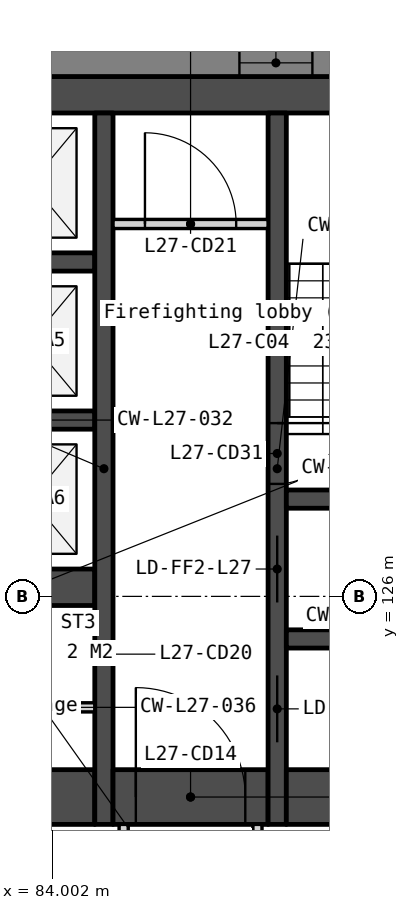
"""IFC4 building model, lengths in metres.
Left out: names, types, materials, properties, quantities, classifications, styles, units other than length and angle.
Written with IfcOpenShell. Run it as: python <this file> out.ifc"""

import sys

from ifc_helpers import new_model, si_unit, direction, frame, frame_2d, origin, place, context, subcontext, project, spatial, polyline, rectangle, outline, extrude, element, fill, save


model = new_model("IFC4")
c1 = context("Model", 3, precision=1e-05, world=origin(), true_north=direction((0.0, 1.0)))
c2 = subcontext(c1, "Body", "Model", "MODEL_VIEW")
j1 = project(units=[si_unit("LENGTHUNIT", "METRE"), si_unit("PLANEANGLEUNIT", "RADIAN")], contexts=[c1])
p1 = place(None, origin())
s1 = spatial("IfcSite", under=j1, at=p1, CompositionType="ELEMENT")
p2 = place(p1, origin())
s2 = spatial("IfcBuilding", under=s1, at=p2, CompositionType="ELEMENT")
p3 = place(p2, frame((0.0, 0.0, 109.8)))
s3 = spatial("IfcBuildingStorey", under=s2, at=p3, CompositionType="ELEMENT", Elevation=109.8)
p4 = place(p3, frame((66.0, 134.25, 0.0), z_axis=(0.0, 0.0, 1.0), x_axis=(1.0, 0.0, 0.0)))
e1 = element("IfcWall", 1, at=p4, inside=s3, PredefinedType="SOLIDWALL", context=c2, shape_type="SweptSolid", body=[
    extrude(rectangle(XDim=28.0, YDim=0.6, at=frame_2d((14.0, 0.0))), origin(), (0.0, 0.0, 1.0), 3.35),
])
p5 = place(p3, frame((81.8, 122.7, 0.0), z_axis=(0.0, 0.0, 1.0), x_axis=(1.0, 0.0, 0.0)))
e2 = element("IfcWall", 2, at=p5, inside=s3, PredefinedType="SOLIDWALL", context=c2, shape_type="SweptSolid", body=[
    extrude(rectangle(XDim=2.9, YDim=0.9, at=frame_2d((1.45, 0.0))), origin(), (0.0, 0.0, 1.0), 3.35),
])
p6 = place(p5, frame((0.05, 0.0, 0.0)))
e3 = element("IfcOpeningElement", 3, at=p6, cuts=e2, PredefinedType="OPENING", context=c2, shape_type="SweptSolid", body=[
    extrude(rectangle(XDim=1.5, YDim=2.1, at=frame_2d((0.75, 1.05))), frame((0.0, 0.46, 0.0), z_axis=(0.0, -1.0, 0.0), x_axis=(1.0, 0.0, 0.0)), (0.0, 0.0, 1.0), 0.92),
])
for number, where, z_axis, x_axis in (
    (4, (82.6, 131.5, 0.0), (0.0, 0.0, 1.0), (1.0, 0.0, 0.0)),
    (5, (82.6, 128.9, 0.0), (0.0, 0.0, 1.0), (1.0, 0.0, 0.0)),
):
    element("IfcWall", number, at=place(p3, frame(where, z_axis=z_axis, x_axis=x_axis)), inside=s3, PredefinedType="SOLIDWALL", context=c2, shape_type="SweptSolid", body=[
        extrude(rectangle(XDim=2.1, YDim=0.3, at=frame_2d((1.05, 0.0))), origin(), (0.0, 0.0, 1.0), 3.35),
    ])
p7 = place(p3, frame((82.6, 126.15, 0.0), z_axis=(0.0, 0.0, 1.0), x_axis=(1.0, 0.0, 0.0)))
e6 = element("IfcWall", 6, at=p7, inside=s3, PredefinedType="SOLIDWALL", context=c2, shape_type="SweptSolid", body=[
    extrude(rectangle(XDim=2.1, YDim=0.6, at=frame_2d((1.05, 0.0))), origin(), (0.0, 0.0, 1.0), 3.35),
])
p8 = place(p3, frame((83.35, 124.175, 0.0), z_axis=(0.0, 0.0, 1.0), x_axis=(1.0, 0.0, 0.0)))
e7 = element("IfcWall", 7, at=p8, inside=s3, PredefinedType="PARTITIONING", context=c2, shape_type="SweptSolid", body=[
    extrude(rectangle(XDim=1.35, YDim=0.15, at=frame_2d((0.675, 0.0))), origin(), (0.0, 0.0, 1.0), 3.35),
])
p9 = place(p3, frame((84.85, 133.95, 0.0), z_axis=(0.0, 0.0, 1.0), x_axis=(0.0, -1.0, 0.0)))
e8 = element("IfcWall", 8, at=p9, inside=s3, PredefinedType="SOLIDWALL", context=c2, shape_type="SweptSolid", body=[
    extrude(rectangle(XDim=11.7, YDim=0.3, at=frame_2d((5.85, 0.0))), origin(), (0.0, 0.0, 1.0), 3.35),
])
p10 = place(p3, frame((85.0, 132.125, 0.0), z_axis=(0.0, 0.0, 1.0), x_axis=(1.0, 0.0, 0.0)))
e9 = element("IfcWall", 9, at=p10, inside=s3, PredefinedType="PARTITIONING", context=c2, shape_type="SweptSolid", body=[
    extrude(rectangle(XDim=2.55, YDim=0.15, at=frame_2d((1.275, 0.0))), origin(), (0.0, 0.0, 1.0), 3.35),
])
p11 = place(p10, frame((0.525, 0.0, 0.0)))
e10 = element("IfcOpeningElement", 10, at=p11, cuts=e9, PredefinedType="OPENING", context=c2, shape_type="SweptSolid", body=[
    extrude(rectangle(XDim=1.5, YDim=2.1, at=frame_2d((0.75, 1.05))), frame((0.0, 0.085, 0.0), z_axis=(0.0, -1.0, 0.0), x_axis=(1.0, 0.0, 0.0)), (0.0, 0.0, 1.0), 0.17),
])
p12 = place(p3, frame((85.0, 122.7, 0.0), z_axis=(0.0, 0.0, 1.0), x_axis=(1.0, 0.0, 0.0)))
e11 = element("IfcWall", 11, at=p12, inside=s3, PredefinedType="SOLIDWALL", context=c2, shape_type="SweptSolid", body=[
    extrude(rectangle(XDim=2.55, YDim=0.9, at=frame_2d((1.275, 0.0))), origin(), (0.0, 0.0, 1.0), 3.35),
])
p13 = place(p12, frame((0.375, 0.0, 0.0)))
e12 = element("IfcOpeningElement", 12, at=p13, cuts=e11, PredefinedType="OPENING", context=c2, shape_type="SweptSolid", body=[
    extrude(rectangle(XDim=1.8, YDim=2.1, at=frame_2d((0.9, 1.05))), frame((0.0, 0.46, 0.0), z_axis=(0.0, -1.0, 0.0), x_axis=(1.0, 0.0, 0.0)), (0.0, 0.0, 1.0), 0.92),
])
p14 = place(p3, frame((85.175, 122.25, 0.0), z_axis=(0.0, 0.0, 1.0), x_axis=(0.0, -1.0, 0.0)))
e13 = element("IfcWall", 13, at=p14, inside=s3, PredefinedType="PARTITIONING", context=c2, shape_type="SweptSolid", body=[
    extrude(rectangle(XDim=2.1, YDim=0.15, at=frame_2d((1.05, 0.0))), origin(), (0.0, 0.0, 1.0), 3.35),
])
p15 = place(p14, frame((0.55, 0.0, 0.0)))
e14 = element("IfcOpeningElement", 14, at=p15, cuts=e13, PredefinedType="OPENING", context=c2, shape_type="SweptSolid", body=[
    extrude(rectangle(XDim=1.0, YDim=2.1, at=frame_2d((0.5, 1.05))), frame((0.0, 0.085, 0.0), z_axis=(0.0, -1.0, 0.0), x_axis=(1.0, 0.0, 0.0)), (0.0, 0.0, 1.0), 0.17),
])
p16 = place(p3, frame((87.375, 122.25, 0.0), z_axis=(0.0, 0.0, 1.0), x_axis=(0.0, -1.0, 0.0)))
e15 = element("IfcWall", 15, at=p16, inside=s3, PredefinedType="PARTITIONING", context=c2, shape_type="SweptSolid", body=[
    extrude(rectangle(XDim=2.1, YDim=0.15, at=frame_2d((1.05, 0.0))), origin(), (0.0, 0.0, 1.0), 3.35),
])
p17 = place(p3, frame((87.7, 133.95, 0.0), z_axis=(0.0, 0.0, 1.0), x_axis=(0.0, -1.0, 0.0)))
e16 = element("IfcWall", 16, at=p17, inside=s3, PredefinedType="SOLIDWALL", context=c2, shape_type="SweptSolid", body=[
    extrude(rectangle(XDim=11.7, YDim=0.3, at=frame_2d((5.85, 0.0))), origin(), (0.0, 0.0, 1.0), 3.35),
])
p18 = place(p17, frame((6.95, 0.0, 0.0)))
e17 = element("IfcOpeningElement", 17, at=p18, cuts=e16, PredefinedType="OPENING", context=c2, shape_type="SweptSolid", body=[
    extrude(rectangle(XDim=1.1, YDim=2.1, at=frame_2d((0.55, 1.05))), frame((0.0, 0.16, 0.0), z_axis=(0.0, -1.0, 0.0), x_axis=(1.0, 0.0, 0.0)), (0.0, 0.0, 1.0), 0.32),
])
p19 = place(p17, frame((5.1, 0.0, 0.0)))
e18 = element("IfcOpeningElement", 18, at=p19, cuts=e16, PredefinedType="OPENING", context=c2, shape_type="SweptSolid", body=[
    extrude(rectangle(XDim=1.0, YDim=2.1, at=frame_2d((0.5, 1.05))), frame((0.0, 0.16, 0.0), z_axis=(0.0, -1.0, 0.0), x_axis=(1.0, 0.0, 0.0)), (0.0, 0.0, 1.0), 0.32),
])
p20 = place(p17, frame((9.25, 0.0, 0.0)))
e19 = element("IfcOpeningElement", 19, at=p20, cuts=e16, PredefinedType="OPENING", context=c2, shape_type="SweptSolid", body=[
    extrude(rectangle(XDim=1.1, YDim=2.1, at=frame_2d((0.55, 1.05))), frame((0.0, 0.16, 0.0), z_axis=(0.0, -1.0, 0.0), x_axis=(1.0, 0.0, 0.0)), (0.0, 0.0, 1.0), 0.32),
])
for number, where, z_axis, x_axis in (
    (20, (87.85, 127.6, 0.0), (0.0, 0.0, 1.0), (1.0, 0.0, 0.0)),
    (21, (87.85, 125.3, 0.0), (0.0, 0.0, 1.0), (1.0, 0.0, 0.0)),
):
    element("IfcWall", number, at=place(p3, frame(where, z_axis=z_axis, x_axis=x_axis)), inside=s3, PredefinedType="SOLIDWALL", context=c2, shape_type="SweptSolid", body=[
        extrude(rectangle(XDim=2.55, YDim=0.3, at=frame_2d((1.275, 0.0))), origin(), (0.0, 0.0, 1.0), 3.35),
    ])
p21 = place(p3, frame((87.85, 122.7, 0.0), z_axis=(0.0, 0.0, 1.0), x_axis=(1.0, 0.0, 0.0)))
e22 = element("IfcWall", 22, at=p21, inside=s3, PredefinedType="SOLIDWALL", context=c2, shape_type="SweptSolid", body=[
    extrude(rectangle(XDim=2.55, YDim=0.9, at=frame_2d((1.275, 0.0))), origin(), (0.0, 0.0, 1.0), 3.35),
])
p22 = place(p3, frame((101.322, 134.775, -0.15), z_axis=(0.0, 0.0, 1.0), x_axis=(-1.0, 0.0, 0.0)))
e23 = element("IfcWall", 23, at=p22, inside=s3, PredefinedType="SOLIDWALL", context=c2, shape_type="SweptSolid", body=[
    extrude(outline(polyline([(42.643, 0.0), (42.643, 3.5), (0.0, 3.5), (0.0, 0.0), (42.643, 0.0)])), frame((0.0, 0.225, 0.0), z_axis=(0.0, -1.0, 0.0), x_axis=(1.0, 0.0, 0.0)), (0.0, 0.0, 1.0), 0.45),
])
p23 = place(p22, frame((2.814, 0.0, 1.05)))
e24 = element("IfcOpeningElement", 24, at=p23, cuts=e23, PredefinedType="OPENING", context=c2, shape_type="SweptSolid", body=[
    extrude(rectangle(XDim=1.2, YDim=1.5, at=frame_2d((0.6, 0.75))), frame((0.0, 0.235, 0.0), z_axis=(0.0, -1.0, 0.0), x_axis=(1.0, 0.0, 0.0)), (0.0, 0.0, 1.0), 0.47),
])
p24 = place(p22, frame((4.514, 0.0, 1.05)))
e25 = element("IfcOpeningElement", 25, at=p24, cuts=e23, PredefinedType="OPENING", context=c2, shape_type="SweptSolid", body=[
    extrude(rectangle(XDim=1.2, YDim=1.5, at=frame_2d((0.6, 0.75))), frame((0.0, 0.235, 0.0), z_axis=(0.0, -1.0, 0.0), x_axis=(1.0, 0.0, 0.0)), (0.0, 0.0, 1.0), 0.47),
])
p25 = place(p22, frame((11.343, 0.0, 1.05)))
e26 = element("IfcOpeningElement", 26, at=p25, cuts=e23, PredefinedType="OPENING", context=c2, shape_type="SweptSolid", body=[
    extrude(rectangle(XDim=1.2, YDim=1.5, at=frame_2d((0.6, 0.75))), frame((0.0, 0.235, 0.0), z_axis=(0.0, -1.0, 0.0), x_axis=(1.0, 0.0, 0.0)), (0.0, 0.0, 1.0), 0.47),
])
p26 = place(p22, frame((13.043, 0.0, 1.05)))
e27 = element("IfcOpeningElement", 27, at=p26, cuts=e23, PredefinedType="OPENING", context=c2, shape_type="SweptSolid", body=[
    extrude(rectangle(XDim=1.2, YDim=1.5, at=frame_2d((0.6, 0.75))), frame((0.0, 0.235, 0.0), z_axis=(0.0, -1.0, 0.0), x_axis=(1.0, 0.0, 0.0)), (0.0, 0.0, 1.0), 0.47),
])
p27 = place(p22, frame((19.872, 0.0, 1.05)))
e28 = element("IfcOpeningElement", 28, at=p27, cuts=e23, PredefinedType="OPENING", context=c2, shape_type="SweptSolid", body=[
    extrude(rectangle(XDim=1.2, YDim=1.5, at=frame_2d((0.6, 0.75))), frame((0.0, 0.235, 0.0), z_axis=(0.0, -1.0, 0.0), x_axis=(1.0, 0.0, 0.0)), (0.0, 0.0, 1.0), 0.47),
])
p28 = place(p22, frame((21.572, 0.0, 1.05)))
e29 = element("IfcOpeningElement", 29, at=p28, cuts=e23, PredefinedType="OPENING", context=c2, shape_type="SweptSolid", body=[
    extrude(rectangle(XDim=1.2, YDim=1.5, at=frame_2d((0.6, 0.75))), frame((0.0, 0.235, 0.0), z_axis=(0.0, -1.0, 0.0), x_axis=(1.0, 0.0, 0.0)), (0.0, 0.0, 1.0), 0.47),
])
p29 = place(p22, frame((28.4, 0.0, 1.05)))
e30 = element("IfcOpeningElement", 30, at=p29, cuts=e23, PredefinedType="OPENING", context=c2, shape_type="SweptSolid", body=[
    extrude(rectangle(XDim=1.2, YDim=1.5, at=frame_2d((0.6, 0.75))), frame((0.0, 0.235, 0.0), z_axis=(0.0, -1.0, 0.0), x_axis=(1.0, 0.0, 0.0)), (0.0, 0.0, 1.0), 0.47),
])
p30 = place(p22, frame((30.1, 0.0, 1.05)))
e31 = element("IfcOpeningElement", 31, at=p30, cuts=e23, PredefinedType="OPENING", context=c2, shape_type="SweptSolid", body=[
    extrude(rectangle(XDim=1.2, YDim=1.5, at=frame_2d((0.6, 0.75))), frame((0.0, 0.235, 0.0), z_axis=(0.0, -1.0, 0.0), x_axis=(1.0, 0.0, 0.0)), (0.0, 0.0, 1.0), 0.47),
])
p31 = place(p22, frame((36.929, 0.0, 1.05)))
e32 = element("IfcOpeningElement", 32, at=p31, cuts=e23, PredefinedType="OPENING", context=c2, shape_type="SweptSolid", body=[
    extrude(rectangle(XDim=1.2, YDim=1.5, at=frame_2d((0.6, 0.75))), frame((0.0, 0.235, 0.0), z_axis=(0.0, -1.0, 0.0), x_axis=(1.0, 0.0, 0.0)), (0.0, 0.0, 1.0), 0.47),
])
p32 = place(p22, frame((38.629, 0.0, 1.05)))
e33 = element("IfcOpeningElement", 33, at=p32, cuts=e23, PredefinedType="OPENING", context=c2, shape_type="SweptSolid", body=[
    extrude(rectangle(XDim=1.2, YDim=1.5, at=frame_2d((0.6, 0.75))), frame((0.0, 0.235, 0.0), z_axis=(0.0, -1.0, 0.0), x_axis=(1.0, 0.0, 0.0)), (0.0, 0.0, 1.0), 0.47),
])
p33 = place(p3, frame((82.605, 93.333, -0.15), z_axis=(0.0, 0.0, 1.0), x_axis=(0.500000478905, 0.866025127289, 0.0)))
e34 = element("IfcWall", 34, at=p33, inside=s3, PredefinedType="SOLIDWALL", context=c2, shape_type="SweptSolid", body=[
    extrude(outline(polyline([(42.643, 0.0), (42.643, 3.5), (0.0, 3.5), (0.0, 0.0), (42.643, 0.0)])), frame((0.0, 0.225, 0.0), z_axis=(0.0, -1.0, 0.0), x_axis=(1.0, 0.0, 0.0)), (0.0, 0.0, 1.0), 0.45),
])
p34 = place(p33, frame((2.814, 0.0, 1.05)))
e35 = element("IfcOpeningElement", 35, at=p34, cuts=e34, PredefinedType="OPENING", context=c2, shape_type="SweptSolid", body=[
    extrude(rectangle(XDim=1.2, YDim=1.5, at=frame_2d((0.6, 0.75))), frame((0.0, 0.235, 0.0), z_axis=(0.0, -1.0, 0.0), x_axis=(1.0, 0.0, 0.0)), (0.0, 0.0, 1.0), 0.47),
])
p35 = place(p33, frame((4.514, 0.0, 1.05)))
e36 = element("IfcOpeningElement", 36, at=p35, cuts=e34, PredefinedType="OPENING", context=c2, shape_type="SweptSolid", body=[
    extrude(rectangle(XDim=1.2, YDim=1.5, at=frame_2d((0.6, 0.75))), frame((0.0, 0.235, 0.0), z_axis=(0.0, -1.0, 0.0), x_axis=(1.0, 0.0, 0.0)), (0.0, 0.0, 1.0), 0.47),
])
p36 = place(p33, frame((11.343, 0.0, 1.05)))
e37 = element("IfcOpeningElement", 37, at=p36, cuts=e34, PredefinedType="OPENING", context=c2, shape_type="SweptSolid", body=[
    extrude(rectangle(XDim=1.2, YDim=1.5, at=frame_2d((0.6, 0.75))), frame((0.0, 0.235, 0.0), z_axis=(0.0, -1.0, 0.0), x_axis=(1.0, 0.0, 0.0)), (0.0, 0.0, 1.0), 0.47),
])
p37 = place(p33, frame((13.043, 0.0, 1.05)))
e38 = element("IfcOpeningElement", 38, at=p37, cuts=e34, PredefinedType="OPENING", context=c2, shape_type="SweptSolid", body=[
    extrude(rectangle(XDim=1.2, YDim=1.5, at=frame_2d((0.6, 0.75))), frame((0.0, 0.235, 0.0), z_axis=(0.0, -1.0, 0.0), x_axis=(1.0, 0.0, 0.0)), (0.0, 0.0, 1.0), 0.47),
])
p38 = place(p33, frame((19.872, 0.0, 1.05)))
e39 = element("IfcOpeningElement", 39, at=p38, cuts=e34, PredefinedType="OPENING", context=c2, shape_type="SweptSolid", body=[
    extrude(rectangle(XDim=1.2, YDim=1.5, at=frame_2d((0.6, 0.75))), frame((0.0, 0.235, 0.0), z_axis=(0.0, -1.0, 0.0), x_axis=(1.0, 0.0, 0.0)), (0.0, 0.0, 1.0), 0.47),
])
p39 = place(p33, frame((21.572, 0.0, 1.05)))
e40 = element("IfcOpeningElement", 40, at=p39, cuts=e34, PredefinedType="OPENING", context=c2, shape_type="SweptSolid", body=[
    extrude(rectangle(XDim=1.2, YDim=1.5, at=frame_2d((0.6, 0.75))), frame((0.0, 0.235, 0.0), z_axis=(0.0, -1.0, 0.0), x_axis=(1.0, 0.0, 0.0)), (0.0, 0.0, 1.0), 0.47),
])
p40 = place(p33, frame((28.4, 0.0, 1.05)))
e41 = element("IfcOpeningElement", 41, at=p40, cuts=e34, PredefinedType="OPENING", context=c2, shape_type="SweptSolid", body=[
    extrude(rectangle(XDim=1.2, YDim=1.5, at=frame_2d((0.6, 0.75))), frame((0.0, 0.235, 0.0), z_axis=(0.0, -1.0, 0.0), x_axis=(1.0, 0.0, 0.0)), (0.0, 0.0, 1.0), 0.47),
])
p41 = place(p33, frame((30.1, 0.0, 1.05)))
e42 = element("IfcOpeningElement", 42, at=p41, cuts=e34, PredefinedType="OPENING", context=c2, shape_type="SweptSolid", body=[
    extrude(rectangle(XDim=1.2, YDim=1.5, at=frame_2d((0.6, 0.75))), frame((0.0, 0.235, 0.0), z_axis=(0.0, -1.0, 0.0), x_axis=(1.0, 0.0, 0.0)), (0.0, 0.0, 1.0), 0.47),
])
p42 = place(p33, frame((36.929, 0.0, 1.05)))
e43 = element("IfcOpeningElement", 43, at=p42, cuts=e34, PredefinedType="OPENING", context=c2, shape_type="SweptSolid", body=[
    extrude(rectangle(XDim=1.2, YDim=1.5, at=frame_2d((0.6, 0.75))), frame((0.0, 0.235, 0.0), z_axis=(0.0, -1.0, 0.0), x_axis=(1.0, 0.0, 0.0)), (0.0, 0.0, 1.0), 0.47),
])
p43 = place(p33, frame((38.629, 0.0, 1.05)))
e44 = element("IfcOpeningElement", 44, at=p43, cuts=e34, PredefinedType="OPENING", context=c2, shape_type="SweptSolid", body=[
    extrude(rectangle(XDim=1.2, YDim=1.5, at=frame_2d((0.6, 0.75))), frame((0.0, 0.235, 0.0), z_axis=(0.0, -1.0, 0.0), x_axis=(1.0, 0.0, 0.0)), (0.0, 0.0, 1.0), 0.47),
])
p44 = place(p18, origin())
e45 = element("IfcDoor", 45, at=p44, inside=s3, OperationType="SLIDING_TO_LEFT", PredefinedType="DOOR", context=c2, shape_type="SweptSolid", body=[
    extrude(rectangle(XDim=1.1, YDim=2.1, at=frame_2d((0.55, 1.05))), frame((0.0, 0.025, 0.0), z_axis=(0.0, -1.0, 0.0), x_axis=(1.0, 0.0, 0.0)), (0.0, 0.0, 1.0), 0.05),
])
fill(e17, e45)
p45 = place(p13, origin())
e46 = element("IfcDoor", 46, at=p45, inside=s3, OperationType="DOUBLE_DOOR_DOUBLE_SWING", PredefinedType="DOOR", context=c2, shape_type="SweptSolid", body=[
    extrude(rectangle(XDim=1.8, YDim=2.1, at=frame_2d((0.9, 1.05))), frame((0.0, 0.025, 0.0), z_axis=(0.0, -1.0, 0.0), x_axis=(1.0, 0.0, 0.0)), (0.0, 0.0, 1.0), 0.05),
])
fill(e12, e46)
p46 = place(p11, origin())
e47 = element("IfcDoor", 47, at=p46, inside=s3, OperationType="DOUBLE_DOOR_DOUBLE_SWING", PredefinedType="DOOR", context=c2, shape_type="SweptSolid", body=[
    extrude(rectangle(XDim=1.5, YDim=2.1, at=frame_2d((0.75, 1.05))), frame((0.0, 0.025, 0.0), z_axis=(0.0, -1.0, 0.0), x_axis=(1.0, 0.0, 0.0)), (0.0, 0.0, 1.0), 0.05),
])
fill(e10, e47)
p47 = place(p19, origin())
e48 = element("IfcDoor", 48, at=p47, inside=s3, OperationType="SINGLE_SWING_LEFT", PredefinedType="DOOR", context=c2, shape_type="SweptSolid", body=[
    extrude(rectangle(XDim=1.0, YDim=2.1, at=frame_2d((0.5, 1.05))), frame((0.0, 0.025, 0.0), z_axis=(0.0, -1.0, 0.0), x_axis=(1.0, 0.0, 0.0)), (0.0, 0.0, 1.0), 0.05),
])
fill(e18, e48)
p48 = place(p20, origin())
e49 = element("IfcDoor", 49, at=p48, inside=s3, OperationType="SLIDING_TO_LEFT", PredefinedType="DOOR", context=c2, shape_type="SweptSolid", body=[
    extrude(rectangle(XDim=1.1, YDim=2.1, at=frame_2d((0.55, 1.05))), frame((0.0, 0.025, 0.0), z_axis=(0.0, -1.0, 0.0), x_axis=(1.0, 0.0, 0.0)), (0.0, 0.0, 1.0), 0.05),
])
fill(e19, e49)
p49 = place(p26, origin())
e50 = element("IfcWindow", 50, at=p49, inside=s3, PartitioningType="SINGLE_PANEL", PredefinedType="WINDOW", context=c2, shape_type="SweptSolid", body=[
    extrude(rectangle(XDim=1.2, YDim=1.5, at=frame_2d((0.6, 0.75))), frame((0.0, 0.03, 0.0), z_axis=(0.0, -1.0, 0.0), x_axis=(1.0, 0.0, 0.0)), (0.0, 0.0, 1.0), 0.06),
])
fill(e27, e50)
save(model, sys.argv[1])
